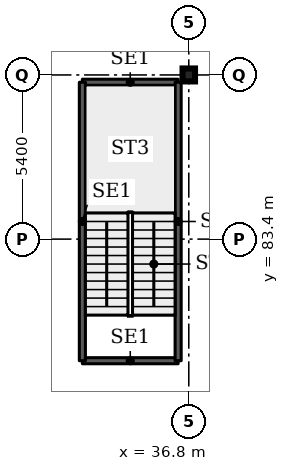
"""IFC4 building model, lengths in metres.
Left out: names, types, materials, properties, quantities, classifications, styles, units other than length and angle.
Written with IfcOpenShell. Run it as: python <this file> out.ifc"""

import sys

from ifc_helpers import new_model, si_unit, direction, frame, frame_2d, origin, origin_2d, place, context, subcontext, project, spatial, rectangle, i_section, extrude, element, save


model = new_model("IFC4")
c1 = context("Model", 3, precision=1e-05, world=origin(), true_north=direction((0.0, 1.0)))
c2 = subcontext(c1, "Body", "Model", "MODEL_VIEW")
j1 = project(units=[si_unit("LENGTHUNIT", "METRE"), si_unit("PLANEANGLEUNIT", "RADIAN")], contexts=[c1])
p1 = place(None, origin())
s1 = spatial("IfcSite", under=j1, at=p1, CompositionType="ELEMENT")
p2 = place(p1, origin())
s2 = spatial("IfcBuilding", under=s1, at=p2, CompositionType="ELEMENT")
p3 = place(p2, frame((0.0, 0.0, 21.5)))
s3 = spatial("IfcBuildingStorey", under=s2, at=p3, CompositionType="ELEMENT", Elevation=21.5)
p4 = place(p3, frame((36.8, 88.8, 0.0), z_axis=(0.0, 0.0, 1.0), x_axis=(1.0, 0.0, 0.0)))
e1 = element("IfcColumn", 1, at=p4, inside=s3, PredefinedType="COLUMN", context=c2, shape_type="SweptSolid", body=[
    extrude(i_section(OverallWidth=0.409, OverallDepth=0.425, WebThickness=0.033, FlangeThickness=0.052, FilletRadius=0.013, at=origin_2d()), origin(), (0.0, 0.0, 1.0), 4.5),
])
for number, where, z_axis, x_axis in (
    (2, (33.3, 79.4, 0.0), (0.0, 0.0, 1.0), (1.0, 0.0, 0.0)),
    (3, (33.3, 88.56, 0.0), (0.0, 0.0, 1.0), (1.0, 0.0, 0.0)),
):
    element("IfcWall", number, at=place(p3, frame(where, z_axis=z_axis, x_axis=x_axis)), inside=s3, PredefinedType="SHEAR", context=c2, shape_type="SweptSolid", body=[
        extrude(rectangle(XDim=3.15, YDim=0.2, at=frame_2d((1.575, 0.0))), origin(), (0.0, 0.0, 1.0), 4.5),
    ])
for number, where, z_axis, x_axis in (
    (4, (33.3, 79.4, 0.0), (0.0, 0.0, 1.0), (0.0, 1.0, 0.0)),
    (5, (36.45, 79.4, 0.0), (0.0, 0.0, 1.0), (0.0, 1.0, 0.0)),
):
    element("IfcWall", number, at=place(p3, frame(where, z_axis=z_axis, x_axis=x_axis)), inside=s3, PredefinedType="SHEAR", context=c2, shape_type="SweptSolid", body=[
        extrude(rectangle(XDim=9.16, YDim=0.2, at=frame_2d((4.58, 0.0))), origin(), (0.0, 0.0, 1.0), 4.5),
    ])
save(model, sys.argv[1])
